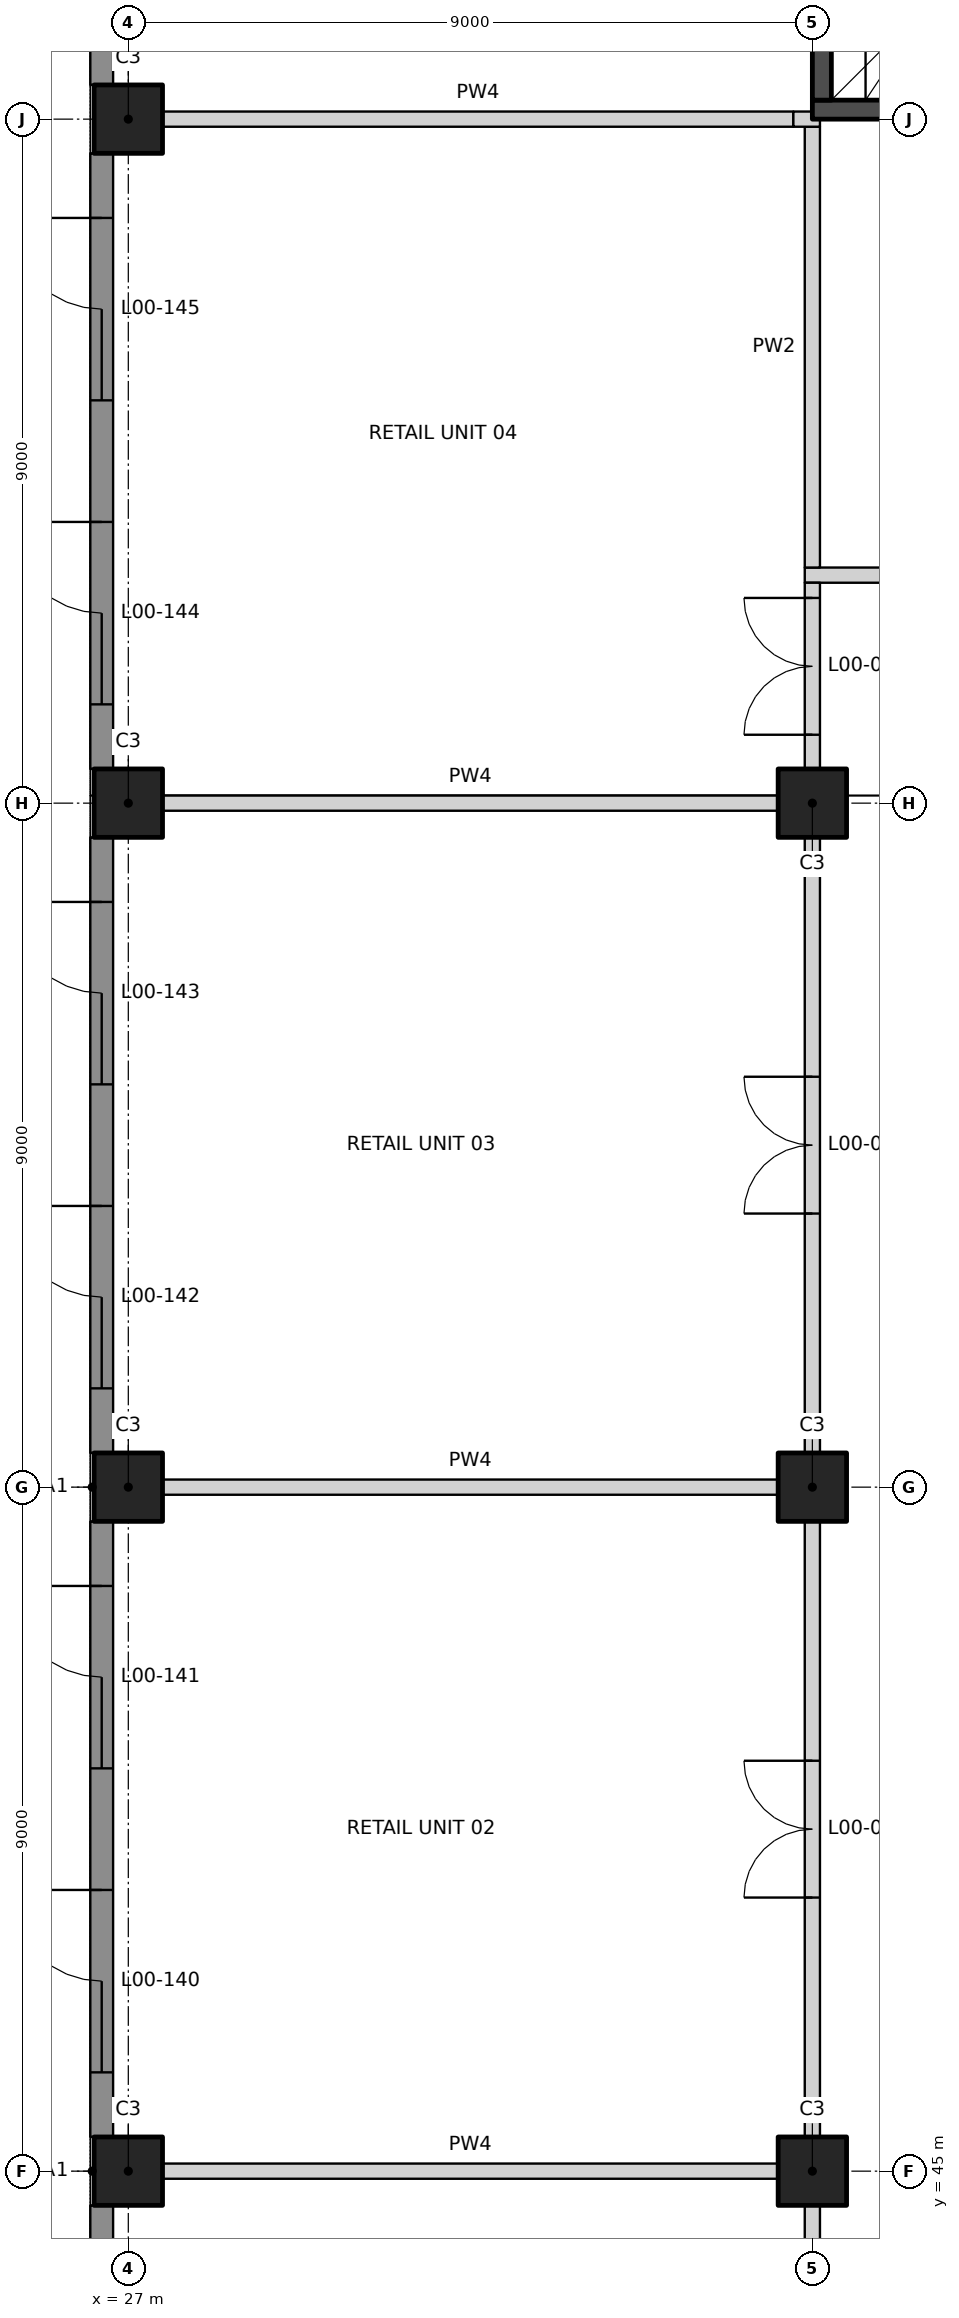
"""IFC4 building model, lengths in metres.
Left out: names, types, materials, properties, quantities, classifications, styles, units other than length and angle.
Written with IfcOpenShell. Run it as: python <this file> out.ifc"""

import sys

from ifc_helpers import new_model, si_unit, direction, frame, frame_2d, origin, origin_2d, place, context, subcontext, project, spatial, rectangle, extrude, element, fill, save


model = new_model("IFC4")
c1 = context("Model", 3, precision=1e-05, world=origin(), true_north=direction((0.0, 1.0)))
c2 = subcontext(c1, "Body", "Model", "MODEL_VIEW")
j1 = project(units=[si_unit("LENGTHUNIT", "METRE"), si_unit("PLANEANGLEUNIT", "RADIAN")], contexts=[c1])
p1 = place(None, origin())
s1 = spatial("IfcSite", under=j1, at=p1, CompositionType="ELEMENT")
p2 = place(p1, origin())
s2 = spatial("IfcBuilding", under=s1, at=p2, CompositionType="ELEMENT")
p3 = place(p2, origin())
s3 = spatial("IfcBuildingStorey", under=s2, at=p3, CompositionType="ELEMENT", Elevation=0.0)
for number, where, z_axis, x_axis in (
    (1, (27.0, 45.0, 0.0), (0.0, 0.0, 1.0), (1.0, 0.0, 0.0)),
    (2, (27.0, 54.0, 0.0), (0.0, 0.0, 1.0), (1.0, 0.0, 0.0)),
    (3, (27.0, 63.0, 0.0), (0.0, 0.0, 1.0), (1.0, 0.0, 0.0)),
    (4, (27.0, 72.0, 0.0), (0.0, 0.0, 1.0), (1.0, 0.0, 0.0)),
    (5, (36.0, 45.0, 0.0), (0.0, 0.0, 1.0), (1.0, 0.0, 0.0)),
    (6, (36.0, 54.0, 0.0), (0.0, 0.0, 1.0), (1.0, 0.0, 0.0)),
    (7, (36.0, 63.0, 0.0), (0.0, 0.0, 1.0), (1.0, 0.0, 0.0)),
):
    element("IfcColumn", number, at=place(p3, frame(where, z_axis=z_axis, x_axis=x_axis)), inside=s3, PredefinedType="COLUMN", context=c2, shape_type="SweptSolid", body=[
        extrude(rectangle(XDim=0.9, YDim=0.9, at=origin_2d()), origin(), (0.0, 0.0, 1.0), 7.0),
    ])
for number, where, z_axis, x_axis in (
    (8, (27.45, 45.0, 0.0), (0.0, 0.0, 1.0), (1.0, 0.0, 0.0)),
    (9, (27.45, 54.0, 0.0), (0.0, 0.0, 1.0), (1.0, 0.0, 0.0)),
    (10, (27.45, 63.0, 0.0), (0.0, 0.0, 1.0), (1.0, 0.0, 0.0)),
):
    element("IfcWall", number, at=place(p3, frame(where, z_axis=z_axis, x_axis=x_axis)), inside=s3, PredefinedType="PARTITIONING", context=c2, shape_type="SweptSolid", body=[
        extrude(rectangle(XDim=8.1, YDim=0.2, at=frame_2d((4.05, 0.0))), origin(), (0.0, 0.0, 1.0), 5.75),
    ])
p4 = place(p3, frame((35.9, 66.0, 0.0), z_axis=(0.0, 0.0, 1.0), x_axis=(1.0, 0.0, 0.0)))
e11 = element("IfcWall", 11, at=p4, inside=s3, PredefinedType="PARTITIONING", context=c2, shape_type="SweptSolid", body=[
    extrude(rectangle(XDim=6.2, YDim=0.2, at=frame_2d((3.1, 0.0))), origin(), (0.0, 0.0, 1.0), 7.0),
])
p5 = place(p4, frame((2.5, 0.0, 0.0)))
e12 = element("IfcOpeningElement", 12, at=p5, cuts=e11, PredefinedType="OPENING", context=c2, shape_type="SweptSolid", body=[
    extrude(rectangle(XDim=1.2, YDim=2.1, at=frame_2d((0.6, 1.05))), frame((0.0, 0.11, 0.0), z_axis=(0.0, -1.0, 0.0), x_axis=(1.0, 0.0, 0.0)), (0.0, 0.0, 1.0), 0.22),
])
p6 = place(p3, frame((27.45, 72.0, 0.0), z_axis=(0.0, 0.0, 1.0), x_axis=(1.0, 0.0, 0.0)))
e13 = element("IfcWall", 13, at=p6, inside=s3, PredefinedType="PARTITIONING", context=c2, shape_type="SweptSolid", body=[
    extrude(rectangle(XDim=8.3, YDim=0.2, at=frame_2d((4.15, 0.0))), origin(), (0.0, 0.0, 1.0), 5.75),
])
p7 = place(p3, frame((36.0, 36.0, 0.0), z_axis=(0.0, 0.0, 1.0), x_axis=(0.0, 1.0, 0.0)))
e14 = element("IfcWall", 14, at=p7, inside=s3, PredefinedType="PARTITIONING", context=c2, shape_type="SweptSolid", body=[
    extrude(rectangle(XDim=8.55, YDim=0.2, at=frame_2d((4.275, 0.0))), origin(), (0.0, 0.0, 1.0), 5.75),
])
p8 = place(p7, frame((3.375, 0.0, 0.0)))
e15 = element("IfcOpeningElement", 15, at=p8, cuts=e14, PredefinedType="OPENING", context=c2, shape_type="SweptSolid", body=[
    extrude(rectangle(XDim=1.8, YDim=2.1, at=frame_2d((0.9, 1.05))), frame((0.0, 0.11, 0.0), z_axis=(0.0, -1.0, 0.0), x_axis=(1.0, 0.0, 0.0)), (0.0, 0.0, 1.0), 0.22),
])
p9 = place(p3, frame((36.0, 45.45, 0.0), z_axis=(0.0, 0.0, 1.0), x_axis=(0.0, 1.0, 0.0)))
e16 = element("IfcWall", 16, at=p9, inside=s3, PredefinedType="PARTITIONING", context=c2, shape_type="SweptSolid", body=[
    extrude(rectangle(XDim=8.1, YDim=0.2, at=frame_2d((4.05, 0.0))), origin(), (0.0, 0.0, 1.0), 5.75),
])
p10 = place(p9, frame((3.15, 0.0, 0.0)))
e17 = element("IfcOpeningElement", 17, at=p10, cuts=e16, PredefinedType="OPENING", context=c2, shape_type="SweptSolid", body=[
    extrude(rectangle(XDim=1.8, YDim=2.1, at=frame_2d((0.9, 1.05))), frame((0.0, 0.11, 0.0), z_axis=(0.0, -1.0, 0.0), x_axis=(1.0, 0.0, 0.0)), (0.0, 0.0, 1.0), 0.22),
])
p11 = place(p3, frame((36.0, 54.45, 0.0), z_axis=(0.0, 0.0, 1.0), x_axis=(0.0, 1.0, 0.0)))
e18 = element("IfcWall", 18, at=p11, inside=s3, PredefinedType="PARTITIONING", context=c2, shape_type="SweptSolid", body=[
    extrude(rectangle(XDim=8.1, YDim=0.2, at=frame_2d((4.05, 0.0))), origin(), (0.0, 0.0, 1.0), 5.75),
])
p12 = place(p11, frame((3.15, 0.0, 0.0)))
e19 = element("IfcOpeningElement", 19, at=p12, cuts=e18, PredefinedType="OPENING", context=c2, shape_type="SweptSolid", body=[
    extrude(rectangle(XDim=1.8, YDim=2.1, at=frame_2d((0.9, 1.05))), frame((0.0, 0.11, 0.0), z_axis=(0.0, -1.0, 0.0), x_axis=(1.0, 0.0, 0.0)), (0.0, 0.0, 1.0), 0.22),
])
p13 = place(p3, frame((36.0, 63.45, 0.0), z_axis=(0.0, 0.0, 1.0), x_axis=(0.0, 1.0, 0.0)))
e20 = element("IfcWall", 20, at=p13, inside=s3, PredefinedType="PARTITIONING", context=c2, shape_type="SweptSolid", body=[
    extrude(rectangle(XDim=2.45, YDim=0.2, at=frame_2d((1.225, 0.0))), origin(), (0.0, 0.0, 1.0), 5.75),
])
p14 = place(p13, frame((0.45, 0.0, 0.0)))
e21 = element("IfcOpeningElement", 21, at=p14, cuts=e20, PredefinedType="OPENING", context=c2, shape_type="SweptSolid", body=[
    extrude(rectangle(XDim=1.8, YDim=2.1, at=frame_2d((0.9, 1.05))), frame((0.0, 0.11, 0.0), z_axis=(0.0, -1.0, 0.0), x_axis=(1.0, 0.0, 0.0)), (0.0, 0.0, 1.0), 0.22),
])
p15 = place(p3, frame((36.0, 66.1, 0.0), z_axis=(0.0, 0.0, 1.0), x_axis=(0.0, 1.0, 0.0)))
e22 = element("IfcWall", 22, at=p15, inside=s3, PredefinedType="PARTITIONING", context=c2, shape_type="SweptSolid", body=[
    extrude(rectangle(XDim=5.8, YDim=0.2, at=frame_2d((2.9, 0.0))), origin(), (0.0, 0.0, 1.0), 5.75),
])
p16 = place(p3, frame((26.65, 44.55, 0.0), z_axis=(0.0, 0.0, 1.0), x_axis=(0.0, -1.0, 0.0)))
e23 = element("IfcWall", 23, at=p16, inside=s3, PredefinedType="SOLIDWALL", context=c2, shape_type="SweptSolid", body=[
    extrude(rectangle(XDim=8.55, YDim=0.3, at=frame_2d((4.275, 0.0))), origin(), (0.0, 0.0, 1.0), 7.0),
])
p17 = place(p16, frame((4.85, 0.0, 0.0)))
e24 = element("IfcOpeningElement", 24, at=p17, cuts=e23, PredefinedType="OPENING", context=c2, shape_type="SweptSolid", body=[
    extrude(rectangle(XDim=2.4, YDim=2.4, at=frame_2d((1.2, 1.2))), frame((0.0, 0.16, 0.0), z_axis=(0.0, -1.0, 0.0), x_axis=(1.0, 0.0, 0.0)), (0.0, 0.0, 1.0), 0.32),
])
p18 = place(p16, frame((0.85, 0.0, 0.0)))
e25 = element("IfcOpeningElement", 25, at=p18, cuts=e23, PredefinedType="OPENING", context=c2, shape_type="SweptSolid", body=[
    extrude(rectangle(XDim=2.4, YDim=2.4, at=frame_2d((1.2, 1.2))), frame((0.0, 0.16, 0.0), z_axis=(0.0, -1.0, 0.0), x_axis=(1.0, 0.0, 0.0)), (0.0, 0.0, 1.0), 0.32),
])
p19 = place(p3, frame((26.65, 53.55, 0.0), z_axis=(0.0, 0.0, 1.0), x_axis=(0.0, -1.0, 0.0)))
e26 = element("IfcWall", 26, at=p19, inside=s3, PredefinedType="SOLIDWALL", context=c2, shape_type="SweptSolid", body=[
    extrude(rectangle(XDim=8.1, YDim=0.3, at=frame_2d((4.05, 0.0))), origin(), (0.0, 0.0, 1.0), 7.0),
])
p20 = place(p19, frame((4.85, 0.0, 0.0)))
e27 = element("IfcOpeningElement", 27, at=p20, cuts=e26, PredefinedType="OPENING", context=c2, shape_type="SweptSolid", body=[
    extrude(rectangle(XDim=2.4, YDim=2.4, at=frame_2d((1.2, 1.2))), frame((0.0, 0.16, 0.0), z_axis=(0.0, -1.0, 0.0), x_axis=(1.0, 0.0, 0.0)), (0.0, 0.0, 1.0), 0.32),
])
p21 = place(p19, frame((0.85, 0.0, 0.0)))
e28 = element("IfcOpeningElement", 28, at=p21, cuts=e26, PredefinedType="OPENING", context=c2, shape_type="SweptSolid", body=[
    extrude(rectangle(XDim=2.4, YDim=2.4, at=frame_2d((1.2, 1.2))), frame((0.0, 0.16, 0.0), z_axis=(0.0, -1.0, 0.0), x_axis=(1.0, 0.0, 0.0)), (0.0, 0.0, 1.0), 0.32),
])
p22 = place(p3, frame((26.65, 62.55, 0.0), z_axis=(0.0, 0.0, 1.0), x_axis=(0.0, -1.0, 0.0)))
e29 = element("IfcWall", 29, at=p22, inside=s3, PredefinedType="SOLIDWALL", context=c2, shape_type="SweptSolid", body=[
    extrude(rectangle(XDim=8.1, YDim=0.3, at=frame_2d((4.05, 0.0))), origin(), (0.0, 0.0, 1.0), 7.0),
])
p23 = place(p22, frame((4.85, 0.0, 0.0)))
e30 = element("IfcOpeningElement", 30, at=p23, cuts=e29, PredefinedType="OPENING", context=c2, shape_type="SweptSolid", body=[
    extrude(rectangle(XDim=2.4, YDim=2.4, at=frame_2d((1.2, 1.2))), frame((0.0, 0.16, 0.0), z_axis=(0.0, -1.0, 0.0), x_axis=(1.0, 0.0, 0.0)), (0.0, 0.0, 1.0), 0.32),
])
p24 = place(p22, frame((0.85, 0.0, 0.0)))
e31 = element("IfcOpeningElement", 31, at=p24, cuts=e29, PredefinedType="OPENING", context=c2, shape_type="SweptSolid", body=[
    extrude(rectangle(XDim=2.4, YDim=2.4, at=frame_2d((1.2, 1.2))), frame((0.0, 0.16, 0.0), z_axis=(0.0, -1.0, 0.0), x_axis=(1.0, 0.0, 0.0)), (0.0, 0.0, 1.0), 0.32),
])
p25 = place(p3, frame((26.65, 71.55, 0.0), z_axis=(0.0, 0.0, 1.0), x_axis=(0.0, -1.0, 0.0)))
e32 = element("IfcWall", 32, at=p25, inside=s3, PredefinedType="SOLIDWALL", context=c2, shape_type="SweptSolid", body=[
    extrude(rectangle(XDim=8.1, YDim=0.3, at=frame_2d((4.05, 0.0))), origin(), (0.0, 0.0, 1.0), 7.0),
])
p26 = place(p25, frame((4.85, 0.0, 0.0)))
e33 = element("IfcOpeningElement", 33, at=p26, cuts=e32, PredefinedType="OPENING", context=c2, shape_type="SweptSolid", body=[
    extrude(rectangle(XDim=2.4, YDim=2.4, at=frame_2d((1.2, 1.2))), frame((0.0, 0.16, 0.0), z_axis=(0.0, -1.0, 0.0), x_axis=(1.0, 0.0, 0.0)), (0.0, 0.0, 1.0), 0.32),
])
p27 = place(p25, frame((0.85, 0.0, 0.0)))
e34 = element("IfcOpeningElement", 34, at=p27, cuts=e32, PredefinedType="OPENING", context=c2, shape_type="SweptSolid", body=[
    extrude(rectangle(XDim=2.4, YDim=2.4, at=frame_2d((1.2, 1.2))), frame((0.0, 0.16, 0.0), z_axis=(0.0, -1.0, 0.0), x_axis=(1.0, 0.0, 0.0)), (0.0, 0.0, 1.0), 0.32),
])
p28 = place(p3, frame((26.65, 80.55, 0.0), z_axis=(0.0, 0.0, 1.0), x_axis=(0.0, -1.0, 0.0)))
e35 = element("IfcWall", 35, at=p28, inside=s3, PredefinedType="SOLIDWALL", context=c2, shape_type="SweptSolid", body=[
    extrude(rectangle(XDim=8.1, YDim=0.3, at=frame_2d((4.05, 0.0))), origin(), (0.0, 0.0, 1.0), 7.0),
])
p29 = place(p28, frame((4.85, 0.0, 0.0)))
e36 = element("IfcOpeningElement", 36, at=p29, cuts=e35, PredefinedType="OPENING", context=c2, shape_type="SweptSolid", body=[
    extrude(rectangle(XDim=2.4, YDim=2.4, at=frame_2d((1.2, 1.2))), frame((0.0, 0.16, 0.0), z_axis=(0.0, -1.0, 0.0), x_axis=(1.0, 0.0, 0.0)), (0.0, 0.0, 1.0), 0.32),
])
p30 = place(p28, frame((0.85, 0.0, 0.0)))
e37 = element("IfcOpeningElement", 37, at=p30, cuts=e35, PredefinedType="OPENING", context=c2, shape_type="SweptSolid", body=[
    extrude(rectangle(XDim=2.4, YDim=2.4, at=frame_2d((1.2, 1.2))), frame((0.0, 0.16, 0.0), z_axis=(0.0, -1.0, 0.0), x_axis=(1.0, 0.0, 0.0)), (0.0, 0.0, 1.0), 0.32),
])
p31 = place(p3, frame((36.0, 72.125, 0.0), z_axis=(0.0, 0.0, 1.0), x_axis=(1.0, 0.0, 0.0)))
e38 = element("IfcWall", 38, at=p31, inside=s3, PredefinedType="SHEAR", context=c2, shape_type="SweptSolid", body=[
    extrude(rectangle(XDim=6.0, YDim=0.25, at=frame_2d((3.0, 0.0))), origin(), (0.0, 0.0, 1.0), 7.0),
])
p32 = place(p31, frame((0.95, 0.0, 0.0)))
e39 = element("IfcOpeningElement", 39, at=p32, cuts=e38, PredefinedType="OPENING", context=c2, shape_type="SweptSolid", body=[
    extrude(rectangle(XDim=1.1, YDim=2.1, at=frame_2d((0.55, 1.05))), frame((0.0, 0.135, 0.0), z_axis=(0.0, -1.0, 0.0), x_axis=(1.0, 0.0, 0.0)), (0.0, 0.0, 1.0), 0.27),
])
p33 = place(p31, frame((3.95, 0.0, 0.0)))
e40 = element("IfcOpeningElement", 40, at=p33, cuts=e38, PredefinedType="OPENING", context=c2, shape_type="SweptSolid", body=[
    extrude(rectangle(XDim=1.1, YDim=2.1, at=frame_2d((0.55, 1.05))), frame((0.0, 0.135, 0.0), z_axis=(0.0, -1.0, 0.0), x_axis=(1.0, 0.0, 0.0)), (0.0, 0.0, 1.0), 0.27),
])
p34 = place(p3, frame((36.125, 72.25, 0.0), z_axis=(0.0, 0.0, 1.0), x_axis=(0.0, 1.0, 0.0)))
e41 = element("IfcWall", 41, at=p34, inside=s3, PredefinedType="SHEAR", context=c2, shape_type="SweptSolid", body=[
    extrude(rectangle(XDim=5.5, YDim=0.25, at=frame_2d((2.75, 0.0))), origin(), (0.0, 0.0, 1.0), 7.0),
])
p35 = place(p3, frame((35.75, 72.0, 0.0), z_axis=(0.0, 0.0, 1.0), x_axis=(1.0, 0.0, 0.0)))
e42 = element("IfcWall", 42, at=p35, inside=s3, PredefinedType="PARTITIONING", context=c2, shape_type="SweptSolid", body=[
    extrude(rectangle(XDim=0.35, YDim=0.2, at=frame_2d((0.175, 0.0))), origin(), (0.0, 0.0, 1.0), 7.0),
])
p36 = place(p10, origin())
e43 = element("IfcDoor", 43, at=p36, inside=s3, OperationType="DOUBLE_DOOR_DOUBLE_SWING", PredefinedType="DOOR", context=c2, shape_type="SweptSolid", body=[
    extrude(rectangle(XDim=1.8, YDim=2.1, at=frame_2d((0.9, 1.05))), frame((0.0, 0.025, 0.0), z_axis=(0.0, -1.0, 0.0), x_axis=(1.0, 0.0, 0.0)), (0.0, 0.0, 1.0), 0.05),
])
fill(e17, e43)
p37 = place(p12, origin())
e44 = element("IfcDoor", 44, at=p37, inside=s3, OperationType="DOUBLE_DOOR_DOUBLE_SWING", PredefinedType="DOOR", context=c2, shape_type="SweptSolid", body=[
    extrude(rectangle(XDim=1.8, YDim=2.1, at=frame_2d((0.9, 1.05))), frame((0.0, 0.025, 0.0), z_axis=(0.0, -1.0, 0.0), x_axis=(1.0, 0.0, 0.0)), (0.0, 0.0, 1.0), 0.05),
])
fill(e19, e44)
p38 = place(p14, origin())
e45 = element("IfcDoor", 45, at=p38, inside=s3, OperationType="DOUBLE_DOOR_DOUBLE_SWING", PredefinedType="DOOR", context=c2, shape_type="SweptSolid", body=[
    extrude(rectangle(XDim=1.8, YDim=2.1, at=frame_2d((0.9, 1.05))), frame((0.0, 0.025, 0.0), z_axis=(0.0, -1.0, 0.0), x_axis=(1.0, 0.0, 0.0)), (0.0, 0.0, 1.0), 0.05),
])
fill(e21, e45)
p39 = place(p20, frame((2.4, 0.0, 0.0), z_axis=(0.0, 0.0, 1.0), x_axis=(-1.0, 0.0, 0.0)))
e46 = element("IfcDoor", 46, at=p39, inside=s3, OperationType="DOUBLE_DOOR_SINGLE_SWING", PredefinedType="DOOR", context=c2, shape_type="SweptSolid", body=[
    extrude(rectangle(XDim=2.4, YDim=2.4, at=frame_2d((1.2, 1.2))), frame((0.0, 0.025, 0.0), z_axis=(0.0, -1.0, 0.0), x_axis=(1.0, 0.0, 0.0)), (0.0, 0.0, 1.0), 0.05),
])
fill(e27, e46)
p40 = place(p21, frame((2.4, 0.0, 0.0), z_axis=(0.0, 0.0, 1.0), x_axis=(-1.0, 0.0, 0.0)))
e47 = element("IfcDoor", 47, at=p40, inside=s3, OperationType="DOUBLE_DOOR_SINGLE_SWING", PredefinedType="DOOR", context=c2, shape_type="SweptSolid", body=[
    extrude(rectangle(XDim=2.4, YDim=2.4, at=frame_2d((1.2, 1.2))), frame((0.0, 0.025, 0.0), z_axis=(0.0, -1.0, 0.0), x_axis=(1.0, 0.0, 0.0)), (0.0, 0.0, 1.0), 0.05),
])
fill(e28, e47)
p41 = place(p23, frame((2.4, 0.0, 0.0), z_axis=(0.0, 0.0, 1.0), x_axis=(-1.0, 0.0, 0.0)))
e48 = element("IfcDoor", 48, at=p41, inside=s3, OperationType="DOUBLE_DOOR_SINGLE_SWING", PredefinedType="DOOR", context=c2, shape_type="SweptSolid", body=[
    extrude(rectangle(XDim=2.4, YDim=2.4, at=frame_2d((1.2, 1.2))), frame((0.0, 0.025, 0.0), z_axis=(0.0, -1.0, 0.0), x_axis=(1.0, 0.0, 0.0)), (0.0, 0.0, 1.0), 0.05),
])
fill(e30, e48)
p42 = place(p24, frame((2.4, 0.0, 0.0), z_axis=(0.0, 0.0, 1.0), x_axis=(-1.0, 0.0, 0.0)))
e49 = element("IfcDoor", 49, at=p42, inside=s3, OperationType="DOUBLE_DOOR_SINGLE_SWING", PredefinedType="DOOR", context=c2, shape_type="SweptSolid", body=[
    extrude(rectangle(XDim=2.4, YDim=2.4, at=frame_2d((1.2, 1.2))), frame((0.0, 0.025, 0.0), z_axis=(0.0, -1.0, 0.0), x_axis=(1.0, 0.0, 0.0)), (0.0, 0.0, 1.0), 0.05),
])
fill(e31, e49)
p43 = place(p26, frame((2.4, 0.0, 0.0), z_axis=(0.0, 0.0, 1.0), x_axis=(-1.0, 0.0, 0.0)))
e50 = element("IfcDoor", 50, at=p43, inside=s3, OperationType="DOUBLE_DOOR_SINGLE_SWING", PredefinedType="DOOR", context=c2, shape_type="SweptSolid", body=[
    extrude(rectangle(XDim=2.4, YDim=2.4, at=frame_2d((1.2, 1.2))), frame((0.0, 0.025, 0.0), z_axis=(0.0, -1.0, 0.0), x_axis=(1.0, 0.0, 0.0)), (0.0, 0.0, 1.0), 0.05),
])
fill(e33, e50)
p44 = place(p27, frame((2.4, 0.0, 0.0), z_axis=(0.0, 0.0, 1.0), x_axis=(-1.0, 0.0, 0.0)))
e51 = element("IfcDoor", 51, at=p44, inside=s3, OperationType="DOUBLE_DOOR_SINGLE_SWING", PredefinedType="DOOR", context=c2, shape_type="SweptSolid", body=[
    extrude(rectangle(XDim=2.4, YDim=2.4, at=frame_2d((1.2, 1.2))), frame((0.0, 0.025, 0.0), z_axis=(0.0, -1.0, 0.0), x_axis=(1.0, 0.0, 0.0)), (0.0, 0.0, 1.0), 0.05),
])
fill(e34, e51)
save(model, sys.argv[1])
